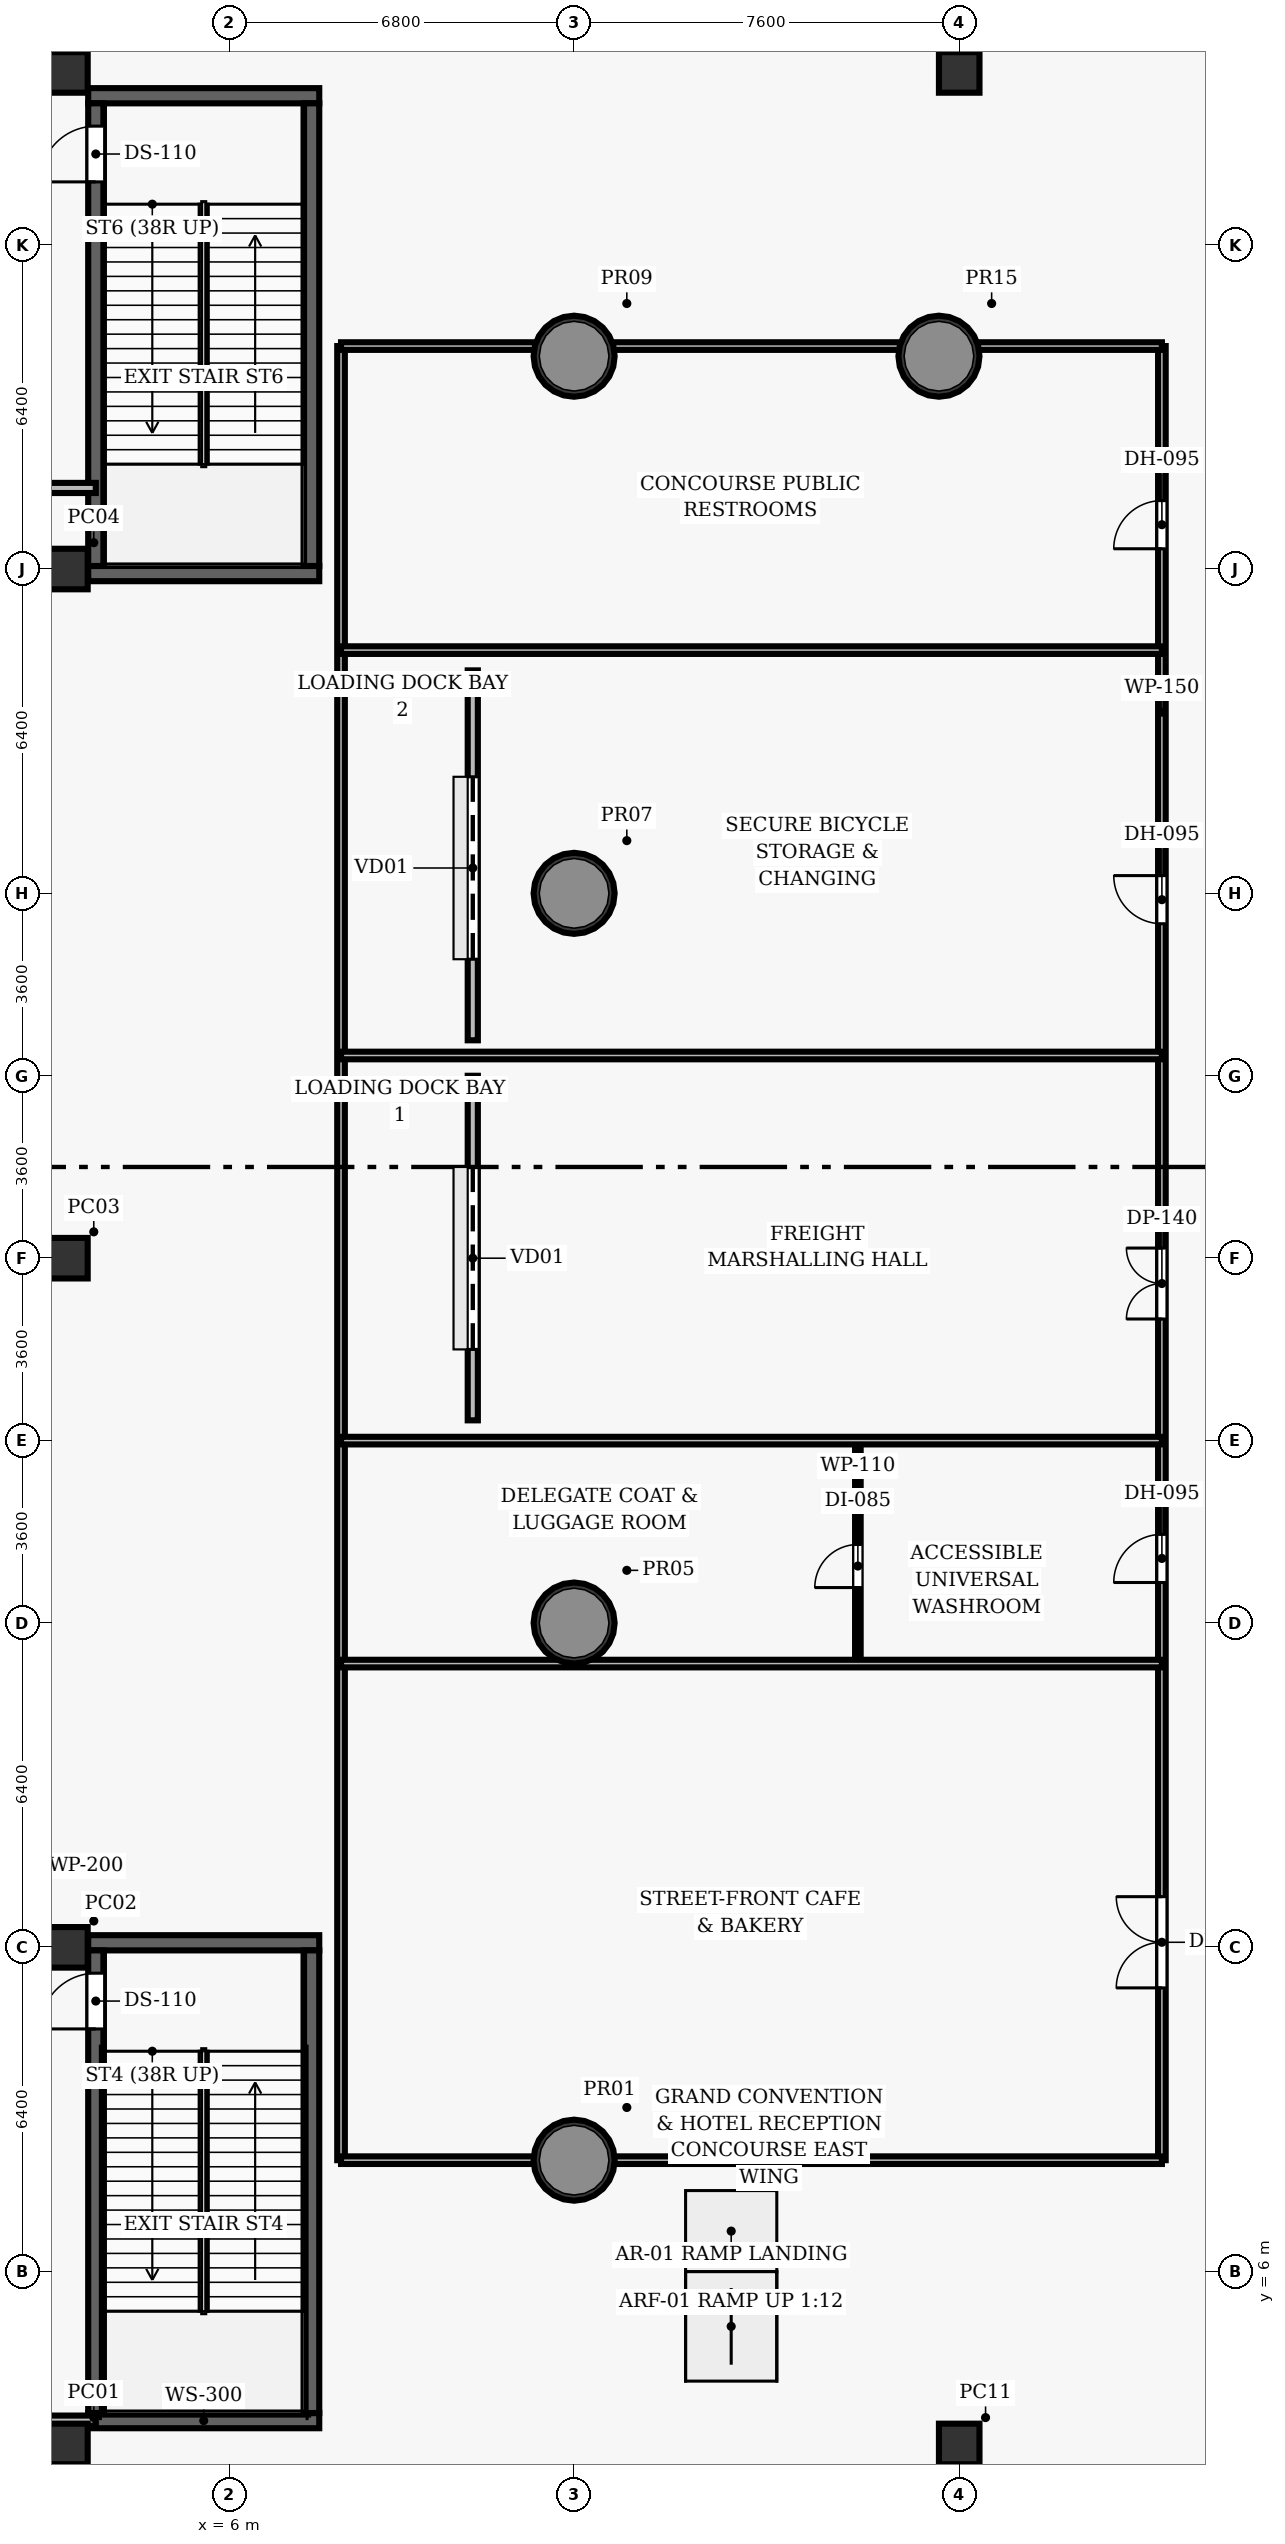
"""IFC4 building model, lengths in metres.
Left out: names, types, materials, properties, quantities, classifications, styles, units other than length and angle.
Written with IfcOpenShell. Run it as: python <this file> out.ifc"""

import sys

from ifc_helpers import new_model, si_unit, direction, frame, frame_2d, origin, origin_2d, place, context, subcontext, project, spatial, rectangle, hollow_circle, extrude, element, fill, save


model = new_model("IFC4")
c1 = context("Model", 3, precision=1e-05, world=origin(), true_north=direction((0.0, 1.0)))
c2 = subcontext(c1, "Body", "Model", "MODEL_VIEW")
j1 = project(units=[si_unit("LENGTHUNIT", "METRE"), si_unit("PLANEANGLEUNIT", "RADIAN")], contexts=[c1])
p1 = place(None, origin())
s1 = spatial("IfcSite", under=j1, at=p1, CompositionType="ELEMENT")
p2 = place(p1, origin())
s2 = spatial("IfcBuilding", under=s1, at=p2, CompositionType="ELEMENT")
p3 = place(p2, origin())
s3 = spatial("IfcBuildingStorey", under=s2, at=p3, CompositionType="ELEMENT", Elevation=0.0)
for number, where, z_axis, x_axis in (
    (1, (2.8, 2.6, 0.0), (0.0, 0.0, 1.0), (1.0, 0.0, 0.0)),
    (2, (2.8, 12.4, 0.0), (0.0, 0.0, 1.0), (1.0, 0.0, 0.0)),
    (3, (2.8, 26.0, 0.0), (0.0, 0.0, 1.0), (1.0, 0.0, 0.0)),
    (4, (2.8, 39.6, 0.0), (0.0, 0.0, 1.0), (1.0, 0.0, 0.0)),
    (5, (2.8, 49.4, 0.0), (0.0, 0.0, 1.0), (1.0, 0.0, 0.0)),
    (6, (20.4, 2.6, 0.0), (0.0, 0.0, 1.0), (1.0, 0.0, 0.0)),
    (7, (20.4, 49.4, 0.0), (0.0, 0.0, 1.0), (1.0, 0.0, 0.0)),
):
    element("IfcColumn", number, at=place(p3, frame(where, z_axis=z_axis, x_axis=x_axis)), inside=s3, PredefinedType="COLUMN", context=c2, shape_type="SweptSolid", body=[
        extrude(rectangle(XDim=0.8, YDim=0.8, at=origin_2d()), origin(), (0.0, 0.0, 1.0), 6.6),
    ])
for number, where, z_axis, x_axis in (
    (8, (12.8, 8.2, 0.0), (0.0, 0.0, 1.0), (1.0, 0.0, 0.0)),
    (9, (12.8, 18.8, 0.0), (0.0, 0.0, 1.0), (1.0, 0.0, 0.0)),
    (10, (12.8, 33.2, 0.0), (0.0, 0.0, 1.0), (1.0, 0.0, 0.0)),
    (11, (12.8, 43.8, 0.0), (0.0, 0.0, 1.0), (1.0, 0.0, 0.0)),
    (12, (20.0, 43.8, 0.0), (0.0, 0.0, 1.0), (1.0, 0.0, 0.0)),
):
    element("IfcColumn", number, at=place(p3, frame(where, z_axis=z_axis, x_axis=x_axis)), inside=s3, PredefinedType="COLUMN", context=c2, shape_type="SweptSolid", body=[
        extrude(hollow_circle(Radius=0.8, WallThickness=0.06, at=origin_2d()), origin(), (0.0, 0.0, 1.0), 6.6),
    ])
for number, where, z_axis, x_axis in (
    (13, (3.21, 3.06, 0.0), (0.0, 0.0, 1.0), (1.0, 0.0, 0.0)),
    (14, (3.21, 12.49, 0.0), (0.0, 0.0, 1.0), (1.0, 0.0, 0.0)),
):
    element("IfcWall", number, at=place(p3, frame(where, z_axis=z_axis, x_axis=x_axis)), inside=s3, PredefinedType="SHEAR", context=c2, shape_type="SweptSolid", body=[
        extrude(rectangle(XDim=4.56, YDim=0.3, at=frame_2d((2.28, 0.0))), origin(), (0.0, 0.0, 1.0), 6.6),
    ])
p4 = place(p3, frame((3.36, 3.21, 0.0), z_axis=(0.0, 0.0, 1.0), x_axis=(0.0, 1.0, 0.0)))
e15 = element("IfcWall", 15, at=p4, inside=s3, PredefinedType="SHEAR", context=c2, shape_type="SweptSolid", body=[
    extrude(rectangle(XDim=9.13, YDim=0.3, at=frame_2d((4.565, 0.0))), origin(), (0.0, 0.0, 1.0), 6.6),
])
p5 = place(p4, frame((7.58, 0.0, 0.0)))
e16 = element("IfcOpeningElement", 16, at=p5, cuts=e15, PredefinedType="OPENING", context=c2, shape_type="SweptSolid", body=[
    extrude(rectangle(XDim=1.1, YDim=2.15, at=frame_2d((0.55, 1.075))), frame((0.0, 0.16, 0.0), z_axis=(0.0, -1.0, 0.0), x_axis=(1.0, 0.0, 0.0)), (0.0, 0.0, 1.0), 0.32),
])
p6 = place(p3, frame((7.62, 12.34, 0.0), z_axis=(0.0, 0.0, 1.0), x_axis=(0.0, -1.0, 0.0)))
e17 = element("IfcWall", 17, at=p6, inside=s3, PredefinedType="SHEAR", context=c2, shape_type="SweptSolid", body=[
    extrude(rectangle(XDim=9.13, YDim=0.3, at=frame_2d((4.565, 0.0))), origin(), (0.0, 0.0, 1.0), 6.6),
])
for number, where, z_axis, x_axis in (
    (18, (3.21, 39.51, 0.0), (0.0, 0.0, 1.0), (1.0, 0.0, 0.0)),
    (19, (3.21, 48.94, 0.0), (0.0, 0.0, 1.0), (1.0, 0.0, 0.0)),
):
    element("IfcWall", number, at=place(p3, frame(where, z_axis=z_axis, x_axis=x_axis)), inside=s3, PredefinedType="SHEAR", context=c2, shape_type="SweptSolid", body=[
        extrude(rectangle(XDim=4.56, YDim=0.3, at=frame_2d((2.28, 0.0))), origin(), (0.0, 0.0, 1.0), 6.6),
    ])
p7 = place(p3, frame((3.36, 39.66, 0.0), z_axis=(0.0, 0.0, 1.0), x_axis=(0.0, 1.0, 0.0)))
e20 = element("IfcWall", 20, at=p7, inside=s3, PredefinedType="SHEAR", context=c2, shape_type="SweptSolid", body=[
    extrude(rectangle(XDim=9.13, YDim=0.3, at=frame_2d((4.565, 0.0))), origin(), (0.0, 0.0, 1.0), 6.6),
])
p8 = place(p7, frame((7.58, 0.0, 0.0)))
e21 = element("IfcOpeningElement", 21, at=p8, cuts=e20, PredefinedType="OPENING", context=c2, shape_type="SweptSolid", body=[
    extrude(rectangle(XDim=1.1, YDim=2.15, at=frame_2d((0.55, 1.075))), frame((0.0, 0.16, 0.0), z_axis=(0.0, -1.0, 0.0), x_axis=(1.0, 0.0, 0.0)), (0.0, 0.0, 1.0), 0.32),
])
p9 = place(p3, frame((7.62, 48.79, 0.0), z_axis=(0.0, 0.0, 1.0), x_axis=(0.0, -1.0, 0.0)))
e22 = element("IfcWall", 22, at=p9, inside=s3, PredefinedType="SHEAR", context=c2, shape_type="SweptSolid", body=[
    extrude(rectangle(XDim=9.13, YDim=0.3, at=frame_2d((4.565, 0.0))), origin(), (0.0, 0.0, 1.0), 6.6),
])
p10 = place(p3, frame((0.4, 14.0, 0.0), z_axis=(0.0, 0.0, 1.0), x_axis=(1.0, 0.0, 0.0)))
e23 = element("IfcWall", 23, at=p10, inside=s3, PredefinedType="PARTITIONING", context=c2, shape_type="SweptSolid", body=[
    extrude(rectangle(XDim=2.96, YDim=0.2, at=frame_2d((1.48, 0.0))), origin(), (0.0, 0.0, 1.0), 5.31),
])
p11 = place(p10, frame((0.35, 0.0, 0.0)))
e24 = element("IfcOpeningElement", 24, at=p11, cuts=e23, PredefinedType="OPENING", context=c2, shape_type="SweptSolid", body=[
    extrude(rectangle(XDim=1.1, YDim=2.15, at=frame_2d((0.55, 1.075))), frame((0.0, 0.11, 0.0), z_axis=(0.0, -1.0, 0.0), x_axis=(1.0, 0.0, 0.0)), (0.0, 0.0, 1.0), 0.22),
])
p12 = place(p3, frame((0.4, 3.06, 0.0), z_axis=(0.0, 0.0, 1.0), x_axis=(1.0, 0.0, 0.0)))
e25 = element("IfcWall", 25, at=p12, inside=s3, PredefinedType="PARTITIONING", context=c2, shape_type="SweptSolid", body=[
    extrude(rectangle(XDim=2.96, YDim=0.2, at=frame_2d((1.48, 0.0))), origin(), (0.0, 0.0, 1.0), 5.31),
])
p13 = place(p3, frame((0.4, 41.2, 0.0), z_axis=(0.0, 0.0, 1.0), x_axis=(1.0, 0.0, 0.0)))
e26 = element("IfcWall", 26, at=p13, inside=s3, PredefinedType="PARTITIONING", context=c2, shape_type="SweptSolid", body=[
    extrude(rectangle(XDim=2.96, YDim=0.2, at=frame_2d((1.48, 0.0))), origin(), (0.0, 0.0, 1.0), 5.31),
])
p14 = place(p13, frame((0.35, 0.0, 0.0)))
e27 = element("IfcOpeningElement", 27, at=p14, cuts=e26, PredefinedType="OPENING", context=c2, shape_type="SweptSolid", body=[
    extrude(rectangle(XDim=1.1, YDim=2.15, at=frame_2d((0.55, 1.075))), frame((0.0, 0.11, 0.0), z_axis=(0.0, -1.0, 0.0), x_axis=(1.0, 0.0, 0.0)), (0.0, 0.0, 1.0), 0.22),
])
p15 = place(p3, frame((24.4, 8.2, 0.0), z_axis=(0.0, 0.0, 1.0), x_axis=(0.0, 1.0, 0.0)))
e28 = element("IfcWall", 28, at=p15, inside=s3, PredefinedType="PARTITIONING", context=c2, shape_type="SweptSolid", body=[
    extrude(rectangle(XDim=35.8, YDim=0.15, at=frame_2d((17.9, 0.0))), origin(), (0.0, 0.0, 1.0), 5.31),
])
p16 = place(p15, frame((3.4, 0.0, 0.0)))
e29 = element("IfcOpeningElement", 29, at=p16, cuts=e28, PredefinedType="OPENING", context=c2, shape_type="SweptSolid", body=[
    extrude(rectangle(XDim=1.8, YDim=2.35, at=frame_2d((0.9, 1.175))), frame((0.0, 0.085, 0.0), z_axis=(0.0, -1.0, 0.0), x_axis=(1.0, 0.0, 0.0)), (0.0, 0.0, 1.0), 0.17),
])
p17 = place(p15, frame((11.4, 0.0, 0.0)))
e30 = element("IfcOpeningElement", 30, at=p17, cuts=e28, PredefinedType="OPENING", context=c2, shape_type="SweptSolid", body=[
    extrude(rectangle(XDim=0.95, YDim=2.15, at=frame_2d((0.475, 1.075))), frame((0.0, 0.085, 0.0), z_axis=(0.0, -1.0, 0.0), x_axis=(1.0, 0.0, 0.0)), (0.0, 0.0, 1.0), 0.17),
])
p18 = place(p15, frame((16.6, 0.0, 0.0)))
e31 = element("IfcOpeningElement", 31, at=p18, cuts=e28, PredefinedType="OPENING", context=c2, shape_type="SweptSolid", body=[
    extrude(rectangle(XDim=1.4, YDim=2.25, at=frame_2d((0.7, 1.125))), frame((0.0, 0.085, 0.0), z_axis=(0.0, -1.0, 0.0), x_axis=(1.0, 0.0, 0.0)), (0.0, 0.0, 1.0), 0.17),
])
p19 = place(p15, frame((24.4, 0.0, 0.0)))
e32 = element("IfcOpeningElement", 32, at=p19, cuts=e28, PredefinedType="OPENING", context=c2, shape_type="SweptSolid", body=[
    extrude(rectangle(XDim=0.95, YDim=2.15, at=frame_2d((0.475, 1.075))), frame((0.0, 0.085, 0.0), z_axis=(0.0, -1.0, 0.0), x_axis=(1.0, 0.0, 0.0)), (0.0, 0.0, 1.0), 0.17),
])
p20 = place(p15, frame((31.8, 0.0, 0.0)))
e33 = element("IfcOpeningElement", 33, at=p20, cuts=e28, PredefinedType="OPENING", context=c2, shape_type="SweptSolid", body=[
    extrude(rectangle(XDim=0.95, YDim=2.15, at=frame_2d((0.475, 1.075))), frame((0.0, 0.085, 0.0), z_axis=(0.0, -1.0, 0.0), x_axis=(1.0, 0.0, 0.0)), (0.0, 0.0, 1.0), 0.17),
])
p21 = place(p3, frame((8.2, 8.2, 0.0), z_axis=(0.0, 0.0, 1.0), x_axis=(0.0, 1.0, 0.0)))
e34 = element("IfcWall", 34, at=p21, inside=s3, PredefinedType="PARTITIONING", context=c2, shape_type="SweptSolid", body=[
    extrude(rectangle(XDim=35.8, YDim=0.15, at=frame_2d((17.9, 0.0))), origin(), (0.0, 0.0, 1.0), 5.31),
])
for number, where, z_axis, x_axis in (
    (35, (8.2, 8.2, 0.0), (0.0, 0.0, 1.0), (1.0, 0.0, 0.0)),
    (36, (8.2, 44.0, 0.0), (0.0, 0.0, 1.0), (1.0, 0.0, 0.0)),
):
    element("IfcWall", number, at=place(p3, frame(where, z_axis=z_axis, x_axis=x_axis)), inside=s3, PredefinedType="PARTITIONING", context=c2, shape_type="SweptSolid", body=[
        extrude(rectangle(XDim=16.2, YDim=0.15, at=frame_2d((8.1, 0.0))), origin(), (0.0, 0.0, 1.0), 5.31),
    ])
p22 = place(p3, frame((18.4, 18.0, 0.0), z_axis=(0.0, 0.0, 1.0), x_axis=(0.0, 1.0, 0.0)))
e37 = element("IfcWall", 37, at=p22, inside=s3, PredefinedType="PARTITIONING", context=c2, shape_type="SweptSolid", body=[
    extrude(rectangle(XDim=4.4, YDim=0.11, at=frame_2d((2.2, 0.0))), origin(), (0.0, 0.0, 1.0), 5.31),
])
p23 = place(p22, frame((1.5, 0.0, 0.0)))
e38 = element("IfcOpeningElement", 38, at=p23, cuts=e37, PredefinedType="OPENING", context=c2, shape_type="SweptSolid", body=[
    extrude(rectangle(XDim=0.85, YDim=2.1, at=frame_2d((0.425, 1.05))), frame((0.0, 0.065, 0.0), z_axis=(0.0, -1.0, 0.0), x_axis=(1.0, 0.0, 0.0)), (0.0, 0.0, 1.0), 0.13),
])
for number, where, z_axis, x_axis in (
    (39, (8.2, 18.0, 0.0), (0.0, 0.0, 1.0), (1.0, 0.0, 0.0)),
    (40, (8.2, 22.4, 0.0), (0.0, 0.0, 1.0), (1.0, 0.0, 0.0)),
    (41, (8.2, 30.0, 0.0), (0.0, 0.0, 1.0), (1.0, 0.0, 0.0)),
    (42, (8.2, 38.0, 0.0), (0.0, 0.0, 1.0), (1.0, 0.0, 0.0)),
):
    element("IfcWall", number, at=place(p3, frame(where, z_axis=z_axis, x_axis=x_axis)), inside=s3, PredefinedType="PARTITIONING", context=c2, shape_type="SweptSolid", body=[
        extrude(rectangle(XDim=16.2, YDim=0.15, at=frame_2d((8.1, 0.0))), origin(), (0.0, 0.0, 1.0), 5.31),
    ])
p24 = place(p3, frame((10.8, 22.8, 0.0), z_axis=(0.0, 0.0, 1.0), x_axis=(0.0, 1.0, 0.0)))
e43 = element("IfcWall", 43, at=p24, inside=s3, PredefinedType="PARTITIONING", context=c2, shape_type="SweptSolid", body=[
    extrude(rectangle(XDim=6.8, YDim=0.2, at=frame_2d((3.4, 0.0))), origin(), (0.0, 0.0, 1.0), 5.31),
])
p25 = place(p24, frame((1.4, 0.0, 0.0)))
e44 = element("IfcOpeningElement", 44, at=p25, cuts=e43, PredefinedType="OPENING", context=c2, shape_type="SweptSolid", body=[
    extrude(rectangle(XDim=3.6, YDim=3.8, at=frame_2d((1.8, 1.9))), frame((0.0, 0.11, 0.0), z_axis=(0.0, -1.0, 0.0), x_axis=(1.0, 0.0, 0.0)), (0.0, 0.0, 1.0), 0.22),
])
p26 = place(p3, frame((10.8, 30.3, 0.0), z_axis=(0.0, 0.0, 1.0), x_axis=(0.0, 1.0, 0.0)))
e45 = element("IfcWall", 45, at=p26, inside=s3, PredefinedType="PARTITIONING", context=c2, shape_type="SweptSolid", body=[
    extrude(rectangle(XDim=7.3, YDim=0.2, at=frame_2d((3.65, 0.0))), origin(), (0.0, 0.0, 1.0), 5.31),
])
p27 = place(p26, frame((1.6, 0.0, 0.0)))
e46 = element("IfcOpeningElement", 46, at=p27, cuts=e45, PredefinedType="OPENING", context=c2, shape_type="SweptSolid", body=[
    extrude(rectangle(XDim=3.6, YDim=3.8, at=frame_2d((1.8, 1.9))), frame((0.0, 0.11, 0.0), z_axis=(0.0, -1.0, 0.0), x_axis=(1.0, 0.0, 0.0)), (0.0, 0.0, 1.0), 0.22),
])
p28 = place(p5, origin())
e47 = element("IfcDoor", 47, at=p28, inside=s3, OperationType="SINGLE_SWING_LEFT", PredefinedType="DOOR", context=c2, shape_type="SweptSolid", body=[
    extrude(rectangle(XDim=1.1, YDim=2.15, at=frame_2d((0.55, 1.075))), frame((0.0, 0.025, 0.0), z_axis=(0.0, -1.0, 0.0), x_axis=(1.0, 0.0, 0.0)), (0.0, 0.0, 1.0), 0.05),
])
fill(e16, e47)
p29 = place(p8, origin())
e48 = element("IfcDoor", 48, at=p29, inside=s3, OperationType="SINGLE_SWING_LEFT", PredefinedType="DOOR", context=c2, shape_type="SweptSolid", body=[
    extrude(rectangle(XDim=1.1, YDim=2.15, at=frame_2d((0.55, 1.075))), frame((0.0, 0.025, 0.0), z_axis=(0.0, -1.0, 0.0), x_axis=(1.0, 0.0, 0.0)), (0.0, 0.0, 1.0), 0.05),
])
fill(e21, e48)
p30 = place(p23, origin())
e49 = element("IfcDoor", 49, at=p30, inside=s3, OperationType="SINGLE_SWING_LEFT", PredefinedType="DOOR", context=c2, shape_type="SweptSolid", body=[
    extrude(rectangle(XDim=0.85, YDim=2.1, at=frame_2d((0.425, 1.05))), frame((0.0, 0.025, 0.0), z_axis=(0.0, -1.0, 0.0), x_axis=(1.0, 0.0, 0.0)), (0.0, 0.0, 1.0), 0.05),
])
fill(e38, e49)
p31 = place(p25, origin())
e50 = element("IfcDoor", 50, at=p31, inside=s3, OperationType="ROLLINGUP", PredefinedType="TRAPDOOR", context=c2, shape_type="SweptSolid", body=[
    extrude(rectangle(XDim=3.6, YDim=3.8, at=frame_2d((1.8, 1.9))), frame((0.0, 0.025, 0.0), z_axis=(0.0, -1.0, 0.0), x_axis=(1.0, 0.0, 0.0)), (0.0, 0.0, 1.0), 0.05),
])
fill(e44, e50)
p32 = place(p27, origin())
e51 = element("IfcDoor", 51, at=p32, inside=s3, OperationType="ROLLINGUP", PredefinedType="TRAPDOOR", context=c2, shape_type="SweptSolid", body=[
    extrude(rectangle(XDim=3.6, YDim=3.8, at=frame_2d((1.8, 1.9))), frame((0.0, 0.025, 0.0), z_axis=(0.0, -1.0, 0.0), x_axis=(1.0, 0.0, 0.0)), (0.0, 0.0, 1.0), 0.05),
])
fill(e46, e51)
p33 = place(p16, origin())
e52 = element("IfcDoor", 52, at=p33, inside=s3, OperationType="DOUBLE_DOOR_SINGLE_SWING", PredefinedType="DOOR", context=c2, shape_type="SweptSolid", body=[
    extrude(rectangle(XDim=1.8, YDim=2.35, at=frame_2d((0.9, 1.175))), frame((0.0, 0.025, 0.0), z_axis=(0.0, -1.0, 0.0), x_axis=(1.0, 0.0, 0.0)), (0.0, 0.0, 1.0), 0.05),
])
fill(e29, e52)
p34 = place(p17, origin())
e53 = element("IfcDoor", 53, at=p34, inside=s3, OperationType="SINGLE_SWING_LEFT", PredefinedType="DOOR", context=c2, shape_type="SweptSolid", body=[
    extrude(rectangle(XDim=0.95, YDim=2.15, at=frame_2d((0.475, 1.075))), frame((0.0, 0.025, 0.0), z_axis=(0.0, -1.0, 0.0), x_axis=(1.0, 0.0, 0.0)), (0.0, 0.0, 1.0), 0.05),
])
fill(e30, e53)
p35 = place(p18, origin())
e54 = element("IfcDoor", 54, at=p35, inside=s3, OperationType="DOUBLE_DOOR_SINGLE_SWING", PredefinedType="DOOR", context=c2, shape_type="SweptSolid", body=[
    extrude(rectangle(XDim=1.4, YDim=2.25, at=frame_2d((0.7, 1.125))), frame((0.0, 0.025, 0.0), z_axis=(0.0, -1.0, 0.0), x_axis=(1.0, 0.0, 0.0)), (0.0, 0.0, 1.0), 0.05),
])
fill(e31, e54)
p36 = place(p19, origin())
e55 = element("IfcDoor", 55, at=p36, inside=s3, OperationType="SINGLE_SWING_RIGHT", PredefinedType="DOOR", context=c2, shape_type="SweptSolid", body=[
    extrude(rectangle(XDim=0.95, YDim=2.15, at=frame_2d((0.475, 1.075))), frame((0.0, 0.025, 0.0), z_axis=(0.0, -1.0, 0.0), x_axis=(1.0, 0.0, 0.0)), (0.0, 0.0, 1.0), 0.05),
])
fill(e32, e55)
p37 = place(p20, origin())
e56 = element("IfcDoor", 56, at=p37, inside=s3, OperationType="SINGLE_SWING_LEFT", PredefinedType="DOOR", context=c2, shape_type="SweptSolid", body=[
    extrude(rectangle(XDim=0.95, YDim=2.15, at=frame_2d((0.475, 1.075))), frame((0.0, 0.025, 0.0), z_axis=(0.0, -1.0, 0.0), x_axis=(1.0, 0.0, 0.0)), (0.0, 0.0, 1.0), 0.05),
])
fill(e33, e56)
save(model, sys.argv[1])
